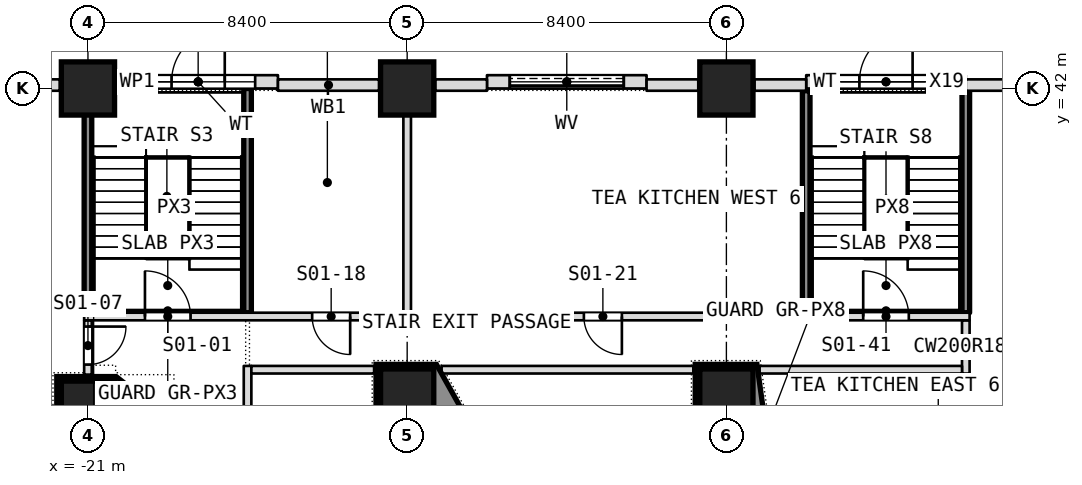
"""IFC4 building model, lengths in metres.
Left out: names, types, materials, properties, quantities, classifications, styles, units other than length and angle.
Written with IfcOpenShell. Run it as: python <this file> out.ifc"""

import sys

from ifc_helpers import new_model, si_unit, direction, frame, frame_2d, origin, origin_2d, place, context, subcontext, project, spatial, polyline, rectangle, outline, extrude, element, fill, save


model = new_model("IFC4")
c1 = context("Model", 3, precision=1e-05, world=origin(), true_north=direction((0.0, 1.0)))
c2 = subcontext(c1, "Body", "Model", "MODEL_VIEW")
j1 = project(units=[si_unit("LENGTHUNIT", "METRE"), si_unit("PLANEANGLEUNIT", "RADIAN")], contexts=[c1])
p1 = place(None, origin())
s1 = spatial("IfcSite", under=j1, at=p1, CompositionType="ELEMENT")
p2 = place(p1, origin())
s2 = spatial("IfcBuilding", under=s1, at=p2, CompositionType="ELEMENT")
p3 = place(p2, origin())
s3 = spatial("IfcBuildingStorey", under=s2, at=p3, CompositionType="ELEMENT", Elevation=0.0)
for number, where, z_axis, x_axis in (
    (1, (-21.0, 33.6, -0.3), (0.0, 0.0, 1.0), (1.0, 0.0, 0.0)),
    (2, (-12.6, 33.92, -0.3), (0.0, 0.0, 1.0), (1.0, 0.0, 0.0)),
    (3, (-4.2, 33.92, -0.3), (0.0, 0.0, 1.0), (1.0, 0.0, 0.0)),
    (4, (-21.0, 42.0, -0.3), (0.0, 0.0, 1.0), (1.0, 0.0, 0.0)),
    (5, (-12.6, 42.0, -0.3), (0.0, 0.0, 1.0), (1.0, 0.0, 0.0)),
    (6, (-4.2, 42.0, -0.3), (0.0, 0.0, 1.0), (1.0, 0.0, 0.0)),
):
    element("IfcColumn", number, at=place(p3, frame(where, z_axis=z_axis, x_axis=x_axis)), inside=s3, PredefinedType="COLUMN", context=c2, shape_type="SweptSolid", body=[
        extrude(rectangle(XDim=1.4, YDim=1.4, at=origin_2d()), origin(), (0.0, 0.0, 1.0), 8.3),
    ])
p4 = place(p3, frame((2.1, 36.1, 0.0), z_axis=(0.0, 0.0, 1.0), x_axis=(0.0, 1.0, 0.0)))
e7 = element("IfcWall", 7, at=p4, inside=s3, PredefinedType="PARTITIONING", context=c2, shape_type="SweptSolid", body=[
    extrude(rectangle(XDim=5.84, YDim=0.2, at=frame_2d((2.92, 0.0))), origin(), (0.0, 0.0, 1.0), 7.68),
])
p5 = place(p3, frame((2.1, 34.5, 0.0), z_axis=(0.0, 0.0, 1.0), x_axis=(0.0, 1.0, 0.0)))
e8 = element("IfcWall", 8, at=p5, inside=s3, PredefinedType="PARTITIONING", context=c2, shape_type="SweptSolid", body=[
    extrude(rectangle(XDim=1.4, YDim=0.2, at=frame_2d((0.7, 0.0))), origin(), (0.0, 0.0, 1.0), 7.68),
])
p6 = place(p3, frame((-2.1, 36.1, 0.0), z_axis=(0.0, 0.0, 1.0), x_axis=(0.0, 1.0, 0.0)))
e9 = element("IfcWall", 9, at=p6, inside=s3, PredefinedType="PARTITIONING", context=c2, shape_type="SweptSolid", body=[
    extrude(rectangle(XDim=5.84, YDim=0.2, at=frame_2d((2.92, 0.0))), origin(), (0.0, 0.0, 1.0), 7.68),
])
p7 = place(p3, frame((-12.6, 36.1, 0.0), z_axis=(0.0, 0.0, 1.0), x_axis=(0.0, 1.0, 0.0)))
e10 = element("IfcWall", 10, at=p7, inside=s3, PredefinedType="PARTITIONING", context=c2, shape_type="SweptSolid", body=[
    extrude(rectangle(XDim=6.2, YDim=0.2, at=frame_2d((3.1, 0.0))), origin(), (0.0, 0.0, 1.0), 7.68),
])
p8 = place(p3, frame((-16.8, 20.9, 0.0), z_axis=(0.0, 0.0, 1.0), x_axis=(0.0, 1.0, 0.0)))
e11 = element("IfcWall", 11, at=p8, inside=s3, PredefinedType="PARTITIONING", context=c2, shape_type="SweptSolid", body=[
    extrude(rectangle(XDim=13.8, YDim=0.2, at=frame_2d((6.9, 0.0))), origin(), (0.0, 0.0, 1.0), 7.68),
])
p9 = place(p8, frame((2.5, 0.0, 0.0)))
e12 = element("IfcOpeningElement", 12, at=p9, cuts=e11, PredefinedType="OPENING", context=c2, shape_type="SweptSolid", body=[
    extrude(rectangle(XDim=1.0, YDim=2.1, at=frame_2d((0.5, 1.05))), frame((0.0, 0.1, 0.0), z_axis=(0.0, -1.0, 0.0), x_axis=(1.0, 0.0, 0.0)), (0.0, 0.0, 1.0), 0.2),
])
p10 = place(p3, frame((-16.8, 36.1, 0.0), z_axis=(0.0, 0.0, 1.0), x_axis=(0.0, 1.0, 0.0)))
e13 = element("IfcWall", 13, at=p10, inside=s3, PredefinedType="PARTITIONING", context=c2, shape_type="SweptSolid", body=[
    extrude(rectangle(XDim=5.9, YDim=0.2, at=frame_2d((2.95, 0.0))), origin(), (0.0, 0.0, 1.0), 7.68),
])
p11 = place(p3, frame((-21.0, 34.47, 0.0), z_axis=(0.0, 0.0, 1.0), x_axis=(0.0, 1.0, 0.0)))
e14 = element("IfcWall", 14, at=p11, inside=s3, PredefinedType="PARTITIONING", context=c2, shape_type="SweptSolid", body=[
    extrude(rectangle(XDim=1.43, YDim=0.2, at=frame_2d((0.715, 0.0))), origin(), (0.0, 0.0, 1.0), 7.68),
])
p12 = place(p11, frame((0.265, 0.0, 0.0)))
e15 = element("IfcOpeningElement", 15, at=p12, cuts=e14, PredefinedType="OPENING", context=c2, shape_type="SweptSolid", body=[
    extrude(rectangle(XDim=1.0, YDim=2.1, at=frame_2d((0.5, 1.05))), frame((0.0, 0.1, 0.0), z_axis=(0.0, -1.0, 0.0), x_axis=(1.0, 0.0, 0.0)), (0.0, 0.0, 1.0), 0.2),
])
p13 = place(p3, frame((-21.0, 36.1, 0.0), z_axis=(0.0, 0.0, 1.0), x_axis=(0.0, 1.0, 0.0)))
e16 = element("IfcWall", 16, at=p13, inside=s3, PredefinedType="PARTITIONING", context=c2, shape_type="SweptSolid", body=[
    extrude(rectangle(XDim=6.2, YDim=0.2, at=frame_2d((3.1, 0.0))), origin(), (0.0, 0.0, 1.0), 7.68),
])
p14 = place(p3, frame((-16.7, 34.6, 0.0), z_axis=(0.0, 0.0, 1.0), x_axis=(1.0, 0.0, 0.0)))
e17 = element("IfcWall", 17, at=p14, inside=s3, PredefinedType="PARTITIONING", context=c2, shape_type="SweptSolid", body=[
    extrude(rectangle(XDim=3.23, YDim=0.2, at=frame_2d((1.615, 0.0))), origin(), (0.0, 0.0, 1.0), 7.68),
])
p15 = place(p3, frame((-11.694, 34.6, 0.0), z_axis=(0.0, 0.0, 1.0), x_axis=(1.0, 0.0, 0.0)))
e18 = element("IfcWall", 18, at=p15, inside=s3, PredefinedType="PARTITIONING", context=c2, shape_type="SweptSolid", body=[
    extrude(rectangle(XDim=6.624, YDim=0.2, at=frame_2d((3.312, 0.0))), origin(), (0.0, 0.0, 1.0), 7.68),
])
p16 = place(p3, frame((-3.326, 34.6, 0.0), z_axis=(0.0, 0.0, 1.0), x_axis=(1.0, 0.0, 0.0)))
e19 = element("IfcWall", 19, at=p16, inside=s3, PredefinedType="PARTITIONING", context=c2, shape_type="SweptSolid", body=[
    extrude(rectangle(XDim=5.326, YDim=0.2, at=frame_2d((2.663, 0.0))), origin(), (0.0, 0.0, 1.0), 7.68),
])
p17 = place(p3, frame((-21.1, 36.0, 0.0), z_axis=(0.0, 0.0, 1.0), x_axis=(1.0, 0.0, 0.0)))
e20 = element("IfcWall", 20, at=p17, inside=s3, PredefinedType="PARTITIONING", context=c2, shape_type="SweptSolid", body=[
    extrude(rectangle(XDim=23.3, YDim=0.2, at=frame_2d((11.65, 0.0))), origin(), (0.0, 0.0, 1.0), 7.68),
])
p18 = place(p17, frame((1.6, 0.0, 0.0)))
e21 = element("IfcOpeningElement", 21, at=p18, cuts=e20, PredefinedType="OPENING", context=c2, shape_type="SweptSolid", body=[
    extrude(rectangle(XDim=1.2, YDim=2.1, at=frame_2d((0.6, 1.05))), frame((0.0, 0.1, 0.0), z_axis=(0.0, -1.0, 0.0), x_axis=(1.0, 0.0, 0.0)), (0.0, 0.0, 1.0), 0.2),
])
p19 = place(p17, frame((6.0, 0.0, 0.0)))
e22 = element("IfcOpeningElement", 22, at=p19, cuts=e20, PredefinedType="OPENING", context=c2, shape_type="SweptSolid", body=[
    extrude(rectangle(XDim=1.0, YDim=2.1, at=frame_2d((0.5, 1.05))), frame((0.0, 0.1, 0.0), z_axis=(0.0, -1.0, 0.0), x_axis=(1.0, 0.0, 0.0)), (0.0, 0.0, 1.0), 0.2),
])
p20 = place(p17, frame((13.15, 0.0, 0.0)))
e23 = element("IfcOpeningElement", 23, at=p20, cuts=e20, PredefinedType="OPENING", context=c2, shape_type="SweptSolid", body=[
    extrude(rectangle(XDim=1.0, YDim=2.1, at=frame_2d((0.5, 1.05))), frame((0.0, 0.1, 0.0), z_axis=(0.0, -1.0, 0.0), x_axis=(1.0, 0.0, 0.0)), (0.0, 0.0, 1.0), 0.2),
])
p21 = place(p17, frame((20.5, 0.0, 0.0)))
e24 = element("IfcOpeningElement", 24, at=p21, cuts=e20, PredefinedType="OPENING", context=c2, shape_type="SweptSolid", body=[
    extrude(rectangle(XDim=1.2, YDim=2.1, at=frame_2d((0.6, 1.05))), frame((0.0, 0.1, 0.0), z_axis=(0.0, -1.0, 0.0), x_axis=(1.0, 0.0, 0.0)), (0.0, 0.0, 1.0), 0.2),
])
p22 = place(p3, frame((-6.3, 42.175, 0.0), z_axis=(0.0, 0.0, 1.0), x_axis=(-1.0, 0.0, 0.0)))
e25 = element("IfcWall", 25, at=p22, inside=s3, PredefinedType="NOTDEFINED", context=c2, shape_type="SweptSolid", body=[
    extrude(rectangle(XDim=4.2, YDim=0.35, at=frame_2d((2.1, 0.0))), origin(), (0.0, 0.0, 1.0), 6.78),
])
p23 = place(p22, frame((0.6, 0.0, 0.0)))
e26 = element("IfcOpeningElement", 26, at=p23, cuts=e25, PredefinedType="OPENING", context=c2, shape_type="SweptSolid", body=[
    extrude(rectangle(XDim=3.0, YDim=3.0, at=frame_2d((1.5, 1.5))), frame((0.0, 0.175, 0.0), z_axis=(0.0, -1.0, 0.0), x_axis=(1.0, 0.0, 0.0)), (0.0, 0.0, 1.0), 0.35),
])
p24 = place(p22, frame((0.6, 0.0, 3.1)))
e27 = element("IfcOpeningElement", 27, at=p24, cuts=e25, PredefinedType="OPENING", context=c2, shape_type="SweptSolid", body=[
    extrude(rectangle(XDim=3.0, YDim=2.4, at=frame_2d((1.5, 1.2))), frame((0.0, 0.175, 0.0), z_axis=(0.0, -1.0, 0.0), x_axis=(1.0, 0.0, 0.0)), (0.0, 0.0, 1.0), 0.35),
])
p25 = place(p3, frame((-16.0, 42.175, 0.0), z_axis=(0.0, 0.0, 1.0), x_axis=(-1.0, 0.0, 0.0)))
e28 = element("IfcWall", 28, at=p25, inside=s3, PredefinedType="NOTDEFINED", context=c2, shape_type="SweptSolid", body=[
    extrude(rectangle(XDim=4.2, YDim=0.35, at=frame_2d((2.1, 0.0))), origin(), (0.0, 0.0, 1.0), 6.78),
])
p26 = place(p25, frame((1.4, 0.0, 0.0)))
e29 = element("IfcOpeningElement", 29, at=p26, cuts=e28, PredefinedType="OPENING", context=c2, shape_type="SweptSolid", body=[
    extrude(rectangle(XDim=1.4, YDim=2.2, at=frame_2d((0.7, 1.1))), frame((0.0, 0.175, 0.0), z_axis=(0.0, -1.0, 0.0), x_axis=(1.0, 0.0, 0.0)), (0.0, 0.0, 1.0), 0.35),
])
p27 = place(p25, frame((0.6, 0.0, 2.9)))
e30 = element("IfcOpeningElement", 30, at=p27, cuts=e28, PredefinedType="OPENING", context=c2, shape_type="SweptSolid", body=[
    extrude(rectangle(XDim=3.0, YDim=2.6, at=frame_2d((1.5, 1.3))), frame((0.0, 0.175, 0.0), z_axis=(0.0, -1.0, 0.0), x_axis=(1.0, 0.0, 0.0)), (0.0, 0.0, 1.0), 0.35),
])
p28 = place(p3, frame((2.1, 42.175, 0.0), z_axis=(0.0, 0.0, 1.0), x_axis=(-1.0, 0.0, 0.0)))
e31 = element("IfcWall", 31, at=p28, inside=s3, PredefinedType="NOTDEFINED", context=c2, shape_type="SweptSolid", body=[
    extrude(rectangle(XDim=4.2, YDim=0.35, at=frame_2d((2.1, 0.0))), origin(), (0.0, 0.0, 1.0), 8.0),
])
p29 = place(p28, frame((1.4, 0.0, 0.0)))
e32 = element("IfcOpeningElement", 32, at=p29, cuts=e31, PredefinedType="OPENING", context=c2, shape_type="SweptSolid", body=[
    extrude(rectangle(XDim=1.4, YDim=2.2, at=frame_2d((0.7, 1.1))), frame((0.0, 0.175, 0.0), z_axis=(0.0, -1.0, 0.0), x_axis=(1.0, 0.0, 0.0)), (0.0, 0.0, 1.0), 0.35),
])
p30 = place(p28, frame((0.6, 0.0, 2.9)))
e33 = element("IfcOpeningElement", 33, at=p30, cuts=e31, PredefinedType="OPENING", context=c2, shape_type="SweptSolid", body=[
    extrude(rectangle(XDim=3.0, YDim=2.6, at=frame_2d((1.5, 1.3))), frame((0.0, 0.175, 0.0), z_axis=(0.0, -1.0, 0.0), x_axis=(1.0, 0.0, 0.0)), (0.0, 0.0, 1.0), 0.35),
])
for number, where, z_axis, x_axis in (
    (34, (3.46, 42.09, 0.0), (0.0, 0.0, 1.0), (-1.0, 0.0, 0.0)),
    (35, (-2.1, 42.09, 0.0), (0.0, 0.0, 1.0), (-1.0, 0.0, 0.0)),
):
    element("IfcWall", number, at=place(p3, frame(where, z_axis=z_axis, x_axis=x_axis)), inside=s3, PredefinedType="NOTDEFINED", context=c2, shape_type="SweptSolid", body=[
        extrude(rectangle(XDim=1.36, YDim=0.3, at=frame_2d((0.68, 0.0))), origin(), (0.0, 0.0, 1.0), 6.78),
    ])
for number, where, z_axis, x_axis in (
    (36, (-4.94, 42.09, 0.0), (0.0, 0.0, 1.0), (-1.0, 0.0, 0.0)),
    (37, (-10.5, 42.09, 0.0), (0.0, 0.0, 1.0), (-1.0, 0.0, 0.0)),
):
    element("IfcWall", number, at=place(p3, frame(where, z_axis=z_axis, x_axis=x_axis)), inside=s3, PredefinedType="NOTDEFINED", context=c2, shape_type="SweptSolid", body=[
        extrude(rectangle(XDim=1.36, YDim=0.3, at=frame_2d((0.68, 0.0))), origin(), (0.0, 0.0, 1.0), 6.78),
    ])
p31 = place(p3, frame((-13.34, 42.09, 0.0), z_axis=(0.0, 0.0, 1.0), x_axis=(-1.0, 0.0, 0.0)))
e38 = element("IfcWall", 38, at=p31, inside=s3, PredefinedType="NOTDEFINED", context=c2, shape_type="SweptSolid", body=[
    extrude(rectangle(XDim=2.66, YDim=0.3, at=frame_2d((1.33, 0.0))), origin(), (0.0, 0.0, 1.0), 6.78),
])
p32 = place(p3, frame((-21.74, 42.09, 0.0), z_axis=(0.0, 0.0, 1.0), x_axis=(-1.0, 0.0, 0.0)))
e39 = element("IfcWall", 39, at=p32, inside=s3, PredefinedType="NOTDEFINED", context=c2, shape_type="SweptSolid", body=[
    extrude(rectangle(XDim=6.92, YDim=0.3, at=frame_2d((3.46, 0.0))), origin(), (0.0, 0.0, 1.0), 6.78),
])
p33 = place(p3, origin())
e40 = element("IfcWall", 40, at=p33, inside=s3, PredefinedType="SOLIDWALL", context=c2, shape_type="SweptSolid", body=[
    extrude(outline(polyline([(-21.82, 34.42), (-20.258, 34.42), (-18.787, 33.258), (-18.787, 31.88), (-20.138, 31.88), (-21.82, 32.83), (-21.82, 34.42)]), holes=[polyline([(-18.907, 32.0), (-18.907, 33.2), (-20.107, 33.2), (-20.107, 32.0), (-18.907, 32.0)]), polyline([(-20.3, 32.9), (-20.3, 34.3), (-21.7, 34.3), (-21.7, 32.9), (-20.3, 32.9)])]), origin(), (0.0, 0.0, 1.0), 8.0),
])
p34 = place(p3, origin())
e41 = element("IfcWall", 41, at=p34, inside=s3, PredefinedType="SOLIDWALL", context=c2, shape_type="SweptSolid", body=[
    extrude(outline(polyline([(-13.42, 34.74), (-11.83, 34.74), (-10.984, 33.231), (-10.984, 31.88), (-12.361, 31.88), (-13.42, 33.177), (-13.42, 34.74)]), holes=[polyline([(-11.104, 32.0), (-11.104, 33.2), (-12.304, 33.2), (-12.304, 32.0), (-11.104, 32.0)]), polyline([(-11.9, 33.22), (-11.9, 34.62), (-13.3, 34.62), (-13.3, 33.22), (-11.9, 33.22)])]), origin(), (0.0, 0.0, 1.0), 8.0),
])
p35 = place(p3, origin())
e42 = element("IfcWall", 42, at=p35, inside=s3, PredefinedType="SOLIDWALL", context=c2, shape_type="SweptSolid", body=[
    extrude(outline(polyline([(-5.02, 34.74), (-3.396, 34.74), (-3.181, 33.208), (-3.181, 31.88), (-4.588, 31.88), (-5.02, 33.201), (-5.02, 34.74)]), holes=[polyline([(-3.302, 32.0), (-3.302, 33.2), (-4.501, 33.2), (-4.501, 32.0), (-3.302, 32.0)]), polyline([(-3.5, 33.22), (-3.5, 34.62), (-4.9, 34.62), (-4.9, 33.22), (-3.5, 33.22)])]), origin(), (0.0, 0.0, 1.0), 8.0),
])
p36 = place(p12, origin())
e43 = element("IfcDoor", 43, at=p36, inside=s3, OperationType="SINGLE_SWING_LEFT", PredefinedType="DOOR", context=c2, shape_type="SweptSolid", body=[
    extrude(rectangle(XDim=1.0, YDim=2.1, at=frame_2d((0.5, 1.05))), frame((0.0, 0.025, 0.0), z_axis=(0.0, -1.0, 0.0), x_axis=(1.0, 0.0, 0.0)), (0.0, 0.0, 1.0), 0.05),
])
fill(e15, e43)
p37 = place(p18, origin())
e44 = element("IfcDoor", 44, at=p37, inside=s3, OperationType="SINGLE_SWING_RIGHT", PredefinedType="DOOR", context=c2, shape_type="SweptSolid", body=[
    extrude(rectangle(XDim=1.2, YDim=2.1, at=frame_2d((0.6, 1.05))), frame((0.0, 0.025, 0.0), z_axis=(0.0, -1.0, 0.0), x_axis=(1.0, 0.0, 0.0)), (0.0, 0.0, 1.0), 0.05),
])
fill(e21, e44)
p38 = place(p19, origin())
e45 = element("IfcDoor", 45, at=p38, inside=s3, OperationType="SINGLE_SWING_RIGHT", PredefinedType="DOOR", context=c2, shape_type="SweptSolid", body=[
    extrude(rectangle(XDim=1.0, YDim=2.1, at=frame_2d((0.5, 1.05))), frame((0.0, 0.025, 0.0), z_axis=(0.0, -1.0, 0.0), x_axis=(1.0, 0.0, 0.0)), (0.0, 0.0, 1.0), 0.05),
])
fill(e22, e45)
p39 = place(p20, origin())
e46 = element("IfcDoor", 46, at=p39, inside=s3, OperationType="SINGLE_SWING_RIGHT", PredefinedType="DOOR", context=c2, shape_type="SweptSolid", body=[
    extrude(rectangle(XDim=1.0, YDim=2.1, at=frame_2d((0.5, 1.05))), frame((0.0, 0.025, 0.0), z_axis=(0.0, -1.0, 0.0), x_axis=(1.0, 0.0, 0.0)), (0.0, 0.0, 1.0), 0.05),
])
fill(e23, e46)
p40 = place(p21, origin())
e47 = element("IfcDoor", 47, at=p40, inside=s3, OperationType="SINGLE_SWING_LEFT", PredefinedType="DOOR", context=c2, shape_type="SweptSolid", body=[
    extrude(rectangle(XDim=1.2, YDim=2.1, at=frame_2d((0.6, 1.05))), frame((0.0, 0.025, 0.0), z_axis=(0.0, -1.0, 0.0), x_axis=(1.0, 0.0, 0.0)), (0.0, 0.0, 1.0), 0.05),
])
fill(e24, e47)
p41 = place(p23, frame((3.0, 0.0, 0.0), z_axis=(0.0, 0.0, 1.0), x_axis=(-1.0, 0.0, 0.0)))
e48 = element("IfcDoor", 48, at=p41, inside=s3, OperationType="SLIDING_TO_LEFT", PredefinedType="DOOR", context=c2, shape_type="SweptSolid", body=[
    extrude(rectangle(XDim=3.0, YDim=3.0, at=frame_2d((1.5, 1.5))), frame((0.0, 0.025, 0.0), z_axis=(0.0, -1.0, 0.0), x_axis=(1.0, 0.0, 0.0)), (0.0, 0.0, 1.0), 0.05),
])
fill(e26, e48)
p42 = place(p24, origin())
e49 = element("IfcWindow", 49, at=p42, inside=s3, PartitioningType="SINGLE_PANEL", PredefinedType="WINDOW", context=c2, shape_type="SweptSolid", body=[
    extrude(rectangle(XDim=3.0, YDim=2.4, at=frame_2d((1.5, 1.2))), frame((0.0, 0.03, 0.0), z_axis=(0.0, -1.0, 0.0), x_axis=(1.0, 0.0, 0.0)), (0.0, 0.0, 1.0), 0.06),
])
fill(e27, e49)
p43 = place(p26, frame((1.4, 0.0, 0.0), z_axis=(0.0, 0.0, 1.0), x_axis=(-1.0, 0.0, 0.0)))
e50 = element("IfcDoor", 50, at=p43, inside=s3, OperationType="SINGLE_SWING_LEFT", PredefinedType="DOOR", context=c2, shape_type="SweptSolid", body=[
    extrude(rectangle(XDim=1.4, YDim=2.2, at=frame_2d((0.7, 1.1))), frame((0.0, 0.025, 0.0), z_axis=(0.0, -1.0, 0.0), x_axis=(1.0, 0.0, 0.0)), (0.0, 0.0, 1.0), 0.05),
])
fill(e29, e50)
p44 = place(p27, origin())
e51 = element("IfcWindow", 51, at=p44, inside=s3, PartitioningType="SINGLE_PANEL", PredefinedType="WINDOW", context=c2, shape_type="SweptSolid", body=[
    extrude(rectangle(XDim=3.0, YDim=2.6, at=frame_2d((1.5, 1.3))), frame((0.0, 0.03, 0.0), z_axis=(0.0, -1.0, 0.0), x_axis=(1.0, 0.0, 0.0)), (0.0, 0.0, 1.0), 0.06),
])
fill(e30, e51)
p45 = place(p29, frame((1.4, 0.0, 0.0), z_axis=(0.0, 0.0, 1.0), x_axis=(-1.0, 0.0, 0.0)))
e52 = element("IfcDoor", 52, at=p45, inside=s3, OperationType="SINGLE_SWING_LEFT", PredefinedType="DOOR", context=c2, shape_type="SweptSolid", body=[
    extrude(rectangle(XDim=1.4, YDim=2.2, at=frame_2d((0.7, 1.1))), frame((0.0, 0.025, 0.0), z_axis=(0.0, -1.0, 0.0), x_axis=(1.0, 0.0, 0.0)), (0.0, 0.0, 1.0), 0.05),
])
fill(e32, e52)
p46 = place(p30, origin())
e53 = element("IfcWindow", 53, at=p46, inside=s3, PartitioningType="SINGLE_PANEL", PredefinedType="WINDOW", context=c2, shape_type="SweptSolid", body=[
    extrude(rectangle(XDim=3.0, YDim=2.6, at=frame_2d((1.5, 1.3))), frame((0.0, 0.03, 0.0), z_axis=(0.0, -1.0, 0.0), x_axis=(1.0, 0.0, 0.0)), (0.0, 0.0, 1.0), 0.06),
])
fill(e33, e53)
save(model, sys.argv[1])
